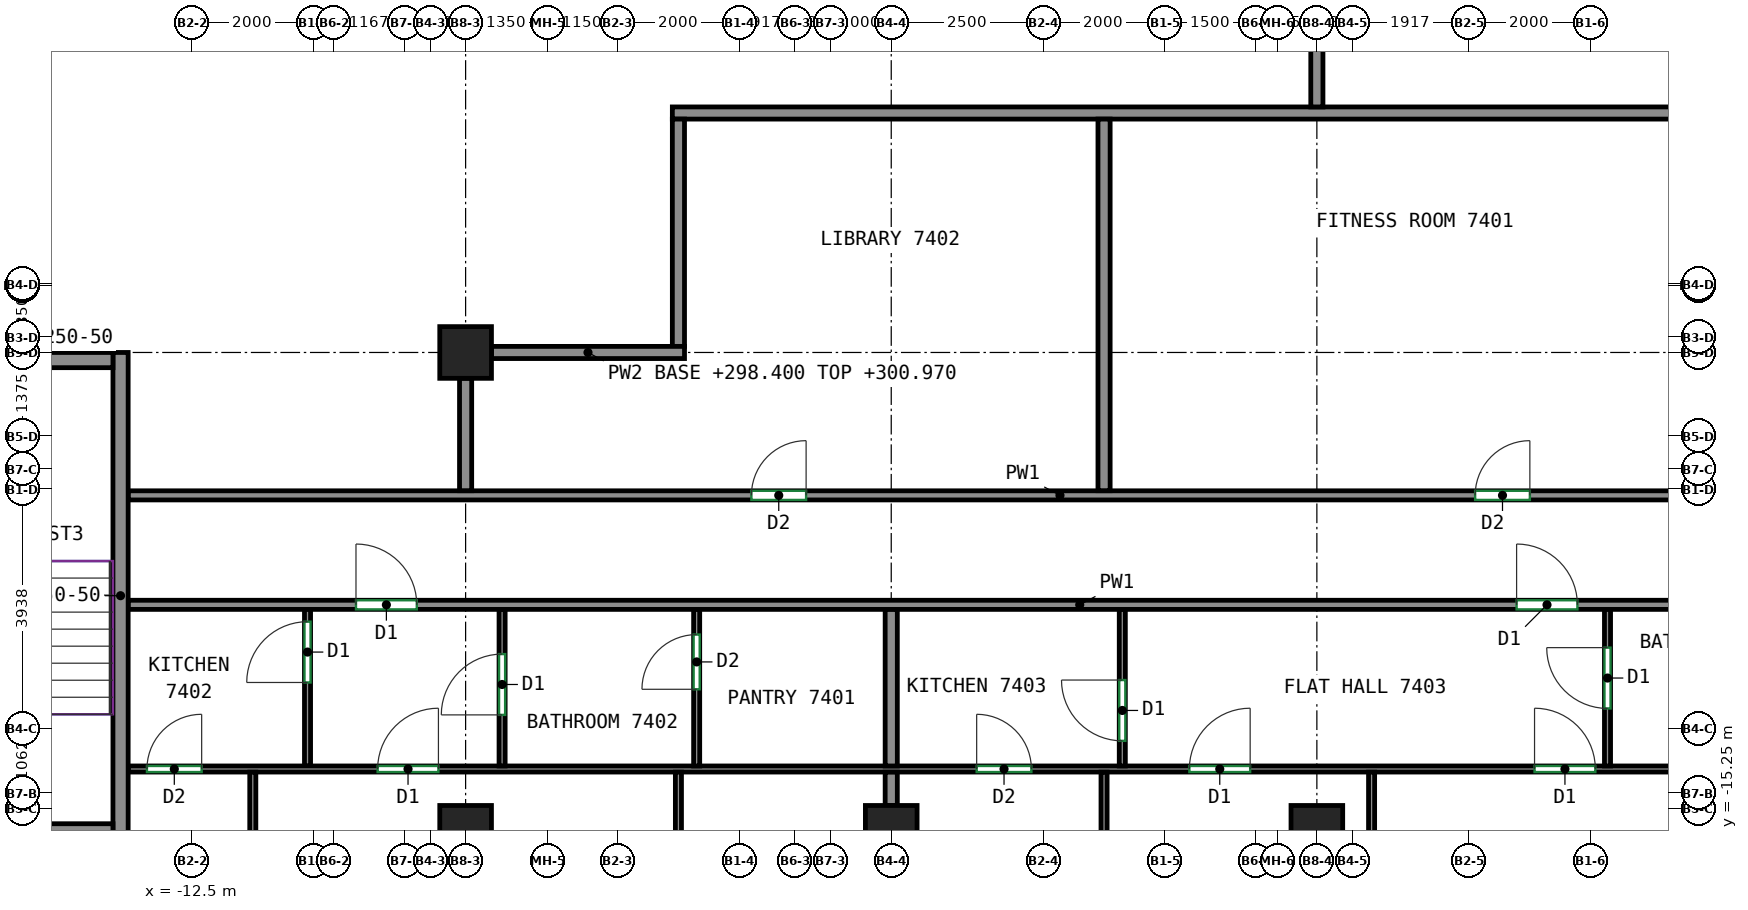
"""IFC4 building model, lengths in metres.
Left out: names, types, materials, properties, quantities, classifications, styles, units other than length and angle.
Written with IfcOpenShell. Run it as: python <this file> out.ifc"""

import sys

from ifc_helpers import new_model, si_unit, direction, frame, frame_2d, origin, origin_2d, place, context, subcontext, project, spatial, rectangle, extrude, source, transform, mapped, element, fill, save


model = new_model("IFC4")
c1 = context("Model", 3, precision=1e-05, world=origin(), true_north=direction((0.0, 1.0)))
c2 = subcontext(c1, "Body", "Model", "MODEL_VIEW")
j1 = project(units=[si_unit("LENGTHUNIT", "METRE"), si_unit("PLANEANGLEUNIT", "RADIAN")], contexts=[c1])
p1 = place(None, origin())
s1 = spatial("IfcSite", under=j1, at=p1, CompositionType="ELEMENT")
p2 = place(p1, origin())
s2 = spatial("IfcBuilding", under=s1, at=p2, CompositionType="ELEMENT")
p3 = place(p2, frame((0.0, 0.0, 298.4)))
s3 = spatial("IfcBuildingStorey", under=s2, at=p3, CompositionType="ELEMENT", Elevation=298.4)
m1 = source(origin(), c2, "Body", "SweptSolid", [
    extrude(rectangle(XDim=0.85, YDim=0.85, at=origin_2d()), origin(), (0.0, 0.0, 1.0), 3.12),
])
for number, where, z_axis, x_axis in (
    (1, (-8.0, -15.625, 0.0), (0.0, 0.0, 1.0), (1.0, 0.0, 0.0)),
    (2, (-8.0, -7.75, 0.0), (0.0, 0.0, 1.0), (1.0, 0.0, 0.0)),
    (3, (-1.0, -15.625, 0.0), (0.0, 0.0, 1.0), (1.0, 0.0, 0.0)),
    (4, (6.0, -15.625, 0.0), (0.0, 0.0, 1.0), (1.0, 0.0, 0.0)),
):
    element("IfcColumn", number, at=place(p3, frame(where, z_axis=z_axis, x_axis=x_axis)), inside=s3, PredefinedType="COLUMN", context=c2, shape_type="MappedRepresentation", body=[
        mapped(m1, transform((0.0, 0.0, 0.0))),
    ])
m2 = source(origin(), c2, "Body", "SweptSolid", [
    extrude(rectangle(XDim=8.0, YDim=0.25, at=frame_2d((4.0, 0.0))), origin(), (0.0, 0.0, 1.0), 3.12),
])
p4 = place(p3, frame((-13.675, -15.75, 0.0), z_axis=(0.0, 0.0, 1.0), x_axis=(0.0, 1.0, 0.0)))
e5 = element("IfcWall", 5, at=p4, inside=s3, PredefinedType="SHEAR", context=c2, shape_type="MappedRepresentation", body=[
    mapped(m2, transform((0.0, 0.0, 0.0))),
])
m3 = source(origin(), c2, "Body", "SweptSolid", [
    extrude(rectangle(XDim=3.7, YDim=0.25, at=frame_2d((1.85, 0.0))), origin(), (0.0, 0.0, 1.0), 3.12),
])
p5 = place(p3, frame((-17.5, -15.625, 0.0), z_axis=(0.0, 0.0, 1.0), x_axis=(1.0, 0.0, 0.0)))
e6 = element("IfcWall", 6, at=p5, inside=s3, PredefinedType="SHEAR", context=c2, shape_type="MappedRepresentation", body=[
    mapped(m3, transform((0.0, 0.0, 0.0))),
])
p6 = place(p5, frame((1.25, 0.0, 0.0)))
e7 = element("IfcOpeningElement", 7, at=p6, cuts=e6, PredefinedType="OPENING", context=c2, shape_type="SweptSolid", body=[
    extrude(rectangle(XDim=1.2, YDim=2.1, at=frame_2d((0.6, 1.05))), frame((0.0, 0.135, 0.0), z_axis=(0.0, -1.0, 0.0), x_axis=(1.0, 0.0, 0.0)), (0.0, 0.0, 1.0), 0.27),
])
p7 = place(p3, frame((-17.5, -7.875, 0.0), z_axis=(0.0, 0.0, 1.0), x_axis=(1.0, 0.0, 0.0)))
e8 = element("IfcWall", 8, at=p7, inside=s3, PredefinedType="SHEAR", context=c2, shape_type="MappedRepresentation", body=[
    mapped(m3, transform((0.0, 0.0, 0.0))),
])
p8 = place(p3, frame((-13.55, -11.9, 0.0), z_axis=(0.0, 0.0, 1.0), x_axis=(1.0, 0.0, 0.0)))
e9 = element("IfcWall", 9, at=p8, inside=s3, PredefinedType="PARTITIONING", context=c2, shape_type="SweptSolid", body=[
    extrude(rectangle(XDim=31.3, YDim=0.15, at=frame_2d((15.65, 0.0))), origin(), (0.0, 0.0, 1.0), 3.12),
])
p9 = place(p8, frame((3.747, 0.0, 0.0)))
e10 = element("IfcOpeningElement", 10, at=p9, cuts=e9, PredefinedType="OPENING", context=c2, shape_type="SweptSolid", body=[
    extrude(rectangle(XDim=1.0, YDim=2.1, at=frame_2d((0.5, 1.05))), frame((0.0, 0.085, 0.0), z_axis=(0.0, -1.0, 0.0), x_axis=(1.0, 0.0, 0.0)), (0.0, 0.0, 1.0), 0.17),
])
p10 = place(p8, frame((22.835, 0.0, 0.0)))
e11 = element("IfcOpeningElement", 11, at=p10, cuts=e9, PredefinedType="OPENING", context=c2, shape_type="SweptSolid", body=[
    extrude(rectangle(XDim=1.0, YDim=2.1, at=frame_2d((0.5, 1.05))), frame((0.0, 0.085, 0.0), z_axis=(0.0, -1.0, 0.0), x_axis=(1.0, 0.0, 0.0)), (0.0, 0.0, 1.0), 0.17),
])
p11 = place(p3, frame((-13.55, -10.1, 0.0), z_axis=(0.0, 0.0, 1.0), x_axis=(1.0, 0.0, 0.0)))
e12 = element("IfcWall", 12, at=p11, inside=s3, PredefinedType="PARTITIONING", context=c2, shape_type="SweptSolid", body=[
    extrude(rectangle(XDim=30.65, YDim=0.15, at=frame_2d((15.325, 0.0))), origin(), (0.0, 0.0, 1.0), 3.12),
])
p12 = place(p11, frame((10.25, 0.0, 0.0)))
e13 = element("IfcOpeningElement", 13, at=p12, cuts=e12, PredefinedType="OPENING", context=c2, shape_type="SweptSolid", body=[
    extrude(rectangle(XDim=0.9, YDim=2.1, at=frame_2d((0.45, 1.05))), frame((0.0, 0.085, 0.0), z_axis=(0.0, -1.0, 0.0), x_axis=(1.0, 0.0, 0.0)), (0.0, 0.0, 1.0), 0.17),
])
p13 = place(p11, frame((22.153, 0.0, 0.0)))
e14 = element("IfcOpeningElement", 14, at=p13, cuts=e12, PredefinedType="OPENING", context=c2, shape_type="SweptSolid", body=[
    extrude(rectangle(XDim=0.9, YDim=2.1, at=frame_2d((0.45, 1.05))), frame((0.0, 0.085, 0.0), z_axis=(0.0, -1.0, 0.0), x_axis=(1.0, 0.0, 0.0)), (0.0, 0.0, 1.0), 0.17),
])
p14 = place(p3, frame((-10.6, -14.55, 0.0), z_axis=(0.0, 0.0, 1.0), x_axis=(0.0, 1.0, 0.0)))
e15 = element("IfcWall", 15, at=p14, inside=s3, PredefinedType="PARTITIONING", context=c2, shape_type="SweptSolid", body=[
    extrude(rectangle(XDim=2.573, YDim=0.1, at=frame_2d((1.287, 0.0))), origin(), (0.0, 0.0, 1.0), 3.12),
])
p15 = place(p14, frame((1.373, 0.0, 0.0)))
e16 = element("IfcOpeningElement", 16, at=p15, cuts=e15, PredefinedType="OPENING", context=c2, shape_type="SweptSolid", body=[
    extrude(rectangle(XDim=1.0, YDim=2.1, at=frame_2d((0.5, 1.05))), frame((0.0, 0.06, 0.0), z_axis=(0.0, -1.0, 0.0), x_axis=(1.0, 0.0, 0.0)), (0.0, 0.0, 1.0), 0.12),
])
p16 = place(p3, frame((-13.55, -14.6, 0.0), z_axis=(0.0, 0.0, 1.0), x_axis=(1.0, 0.0, 0.0)))
e17 = element("IfcWall", 17, at=p16, inside=s3, PredefinedType="PARTITIONING", context=c2, shape_type="SweptSolid", body=[
    extrude(rectangle(XDim=31.3, YDim=0.1, at=frame_2d((15.65, 0.0))), origin(), (0.0, 0.0, 1.0), 3.12),
])
p17 = place(p16, frame((0.309, 0.0, 0.0)))
e18 = element("IfcOpeningElement", 18, at=p17, cuts=e17, PredefinedType="OPENING", context=c2, shape_type="SweptSolid", body=[
    extrude(rectangle(XDim=0.9, YDim=2.1, at=frame_2d((0.45, 1.05))), frame((0.0, 0.06, 0.0), z_axis=(0.0, -1.0, 0.0), x_axis=(1.0, 0.0, 0.0)), (0.0, 0.0, 1.0), 0.12),
])
p18 = place(p16, frame((4.103, 0.0, 0.0)))
e19 = element("IfcOpeningElement", 19, at=p18, cuts=e17, PredefinedType="OPENING", context=c2, shape_type="SweptSolid", body=[
    extrude(rectangle(XDim=1.0, YDim=2.1, at=frame_2d((0.5, 1.05))), frame((0.0, 0.06, 0.0), z_axis=(0.0, -1.0, 0.0), x_axis=(1.0, 0.0, 0.0)), (0.0, 0.0, 1.0), 0.12),
])
p19 = place(p16, frame((13.955, 0.0, 0.0)))
e20 = element("IfcOpeningElement", 20, at=p19, cuts=e17, PredefinedType="OPENING", context=c2, shape_type="SweptSolid", body=[
    extrude(rectangle(XDim=0.9, YDim=2.1, at=frame_2d((0.45, 1.05))), frame((0.0, 0.06, 0.0), z_axis=(0.0, -1.0, 0.0), x_axis=(1.0, 0.0, 0.0)), (0.0, 0.0, 1.0), 0.12),
])
p20 = place(p16, frame((17.453, 0.0, 0.0)))
e21 = element("IfcOpeningElement", 21, at=p20, cuts=e17, PredefinedType="OPENING", context=c2, shape_type="SweptSolid", body=[
    extrude(rectangle(XDim=1.0, YDim=2.1, at=frame_2d((0.5, 1.05))), frame((0.0, 0.06, 0.0), z_axis=(0.0, -1.0, 0.0), x_axis=(1.0, 0.0, 0.0)), (0.0, 0.0, 1.0), 0.12),
])
p21 = place(p16, frame((23.13, 0.0, 0.0)))
e22 = element("IfcOpeningElement", 22, at=p21, cuts=e17, PredefinedType="OPENING", context=c2, shape_type="SweptSolid", body=[
    extrude(rectangle(XDim=1.0, YDim=2.1, at=frame_2d((0.5, 1.05))), frame((0.0, 0.06, 0.0), z_axis=(0.0, -1.0, 0.0), x_axis=(1.0, 0.0, 0.0)), (0.0, 0.0, 1.0), 0.12),
])
p22 = place(p3, frame((-7.4, -14.55, 0.0), z_axis=(0.0, 0.0, 1.0), x_axis=(0.0, 1.0, 0.0)))
e23 = element("IfcWall", 23, at=p22, inside=s3, PredefinedType="PARTITIONING", context=c2, shape_type="SweptSolid", body=[
    extrude(rectangle(XDim=2.573, YDim=0.1, at=frame_2d((1.287, 0.0))), origin(), (0.0, 0.0, 1.0), 3.12),
])
p23 = place(p22, frame((0.84, 0.0, 0.0)))
e24 = element("IfcOpeningElement", 24, at=p23, cuts=e23, PredefinedType="OPENING", context=c2, shape_type="SweptSolid", body=[
    extrude(rectangle(XDim=1.0, YDim=2.1, at=frame_2d((0.5, 1.05))), frame((0.0, 0.06, 0.0), z_axis=(0.0, -1.0, 0.0), x_axis=(1.0, 0.0, 0.0)), (0.0, 0.0, 1.0), 0.12),
])
p24 = place(p3, frame((-4.2, -14.55, 0.0), z_axis=(0.0, 0.0, 1.0), x_axis=(0.0, 1.0, 0.0)))
e25 = element("IfcWall", 25, at=p24, inside=s3, PredefinedType="PARTITIONING", context=c2, shape_type="SweptSolid", body=[
    extrude(rectangle(XDim=2.573, YDim=0.1, at=frame_2d((1.287, 0.0))), origin(), (0.0, 0.0, 1.0), 3.12),
])
p25 = place(p24, frame((1.261, 0.0, 0.0)))
e26 = element("IfcOpeningElement", 26, at=p25, cuts=e25, PredefinedType="OPENING", context=c2, shape_type="SweptSolid", body=[
    extrude(rectangle(XDim=0.9, YDim=2.1, at=frame_2d((0.45, 1.05))), frame((0.0, 0.06, 0.0), z_axis=(0.0, -1.0, 0.0), x_axis=(1.0, 0.0, 0.0)), (0.0, 0.0, 1.0), 0.12),
])
p26 = place(p3, frame((-1.0, -14.55, 0.0), z_axis=(0.0, 0.0, 1.0), x_axis=(0.0, 1.0, 0.0)))
e27 = element("IfcWall", 27, at=p26, inside=s3, PredefinedType="PARTITIONING", context=c2, shape_type="SweptSolid", body=[
    extrude(rectangle(XDim=2.573, YDim=0.2, at=frame_2d((1.287, 0.0))), origin(), (0.0, 0.0, 1.0), 3.12),
])
p27 = place(p3, frame((-11.5, -23.25, 0.0), z_axis=(0.0, 0.0, 1.0), x_axis=(0.0, 1.0, 0.0)))
e28 = element("IfcWall", 28, at=p27, inside=s3, PredefinedType="PARTITIONING", context=c2, shape_type="SweptSolid", body=[
    extrude(rectangle(XDim=8.598, YDim=0.1, at=frame_2d((4.299, 0.0))), origin(), (0.0, 0.0, 1.0), 3.12),
])
p28 = place(p3, frame((-4.5, -23.25, 0.0), z_axis=(0.0, 0.0, 1.0), x_axis=(0.0, 1.0, 0.0)))
e29 = element("IfcWall", 29, at=p28, inside=s3, PredefinedType="PARTITIONING", context=c2, shape_type="SweptSolid", body=[
    extrude(rectangle(XDim=8.598, YDim=0.1, at=frame_2d((4.299, 0.0))), origin(), (0.0, 0.0, 1.0), 3.12),
])
p29 = place(p28, frame((1.112, 0.0, 0.0)))
e30 = element("IfcOpeningElement", 30, at=p29, cuts=e29, PredefinedType="OPENING", context=c2, shape_type="SweptSolid", body=[
    extrude(rectangle(XDim=0.9, YDim=2.1, at=frame_2d((0.45, 1.05))), frame((0.0, 0.06, 0.0), z_axis=(0.0, -1.0, 0.0), x_axis=(1.0, 0.0, 0.0)), (0.0, 0.0, 1.0), 0.12),
])
p30 = place(p3, frame((-1.0, -15.2, 0.0), z_axis=(0.0, 0.0, 1.0), x_axis=(0.0, 1.0, 0.0)))
e31 = element("IfcWall", 31, at=p30, inside=s3, PredefinedType="PARTITIONING", context=c2, shape_type="SweptSolid", body=[
    extrude(rectangle(XDim=0.548, YDim=0.2, at=frame_2d((0.274, 0.0))), origin(), (0.0, 0.0, 1.0), 3.12),
])
p31 = place(p3, frame((2.8, -14.55, 0.0), z_axis=(0.0, 0.0, 1.0), x_axis=(0.0, 1.0, 0.0)))
e32 = element("IfcWall", 32, at=p31, inside=s3, PredefinedType="PARTITIONING", context=c2, shape_type="SweptSolid", body=[
    extrude(rectangle(XDim=2.573, YDim=0.1, at=frame_2d((1.287, 0.0))), origin(), (0.0, 0.0, 1.0), 3.12),
])
p32 = place(p31, frame((0.413, 0.0, 0.0)))
e33 = element("IfcOpeningElement", 33, at=p32, cuts=e32, PredefinedType="OPENING", context=c2, shape_type="SweptSolid", body=[
    extrude(rectangle(XDim=1.0, YDim=2.1, at=frame_2d((0.5, 1.05))), frame((0.0, 0.06, 0.0), z_axis=(0.0, -1.0, 0.0), x_axis=(1.0, 0.0, 0.0)), (0.0, 0.0, 1.0), 0.12),
])
p33 = place(p3, frame((10.78, -14.55, 0.0), z_axis=(0.0, 0.0, 1.0), x_axis=(0.0, 1.0, 0.0)))
e34 = element("IfcWall", 34, at=p33, inside=s3, PredefinedType="PARTITIONING", context=c2, shape_type="SweptSolid", body=[
    extrude(rectangle(XDim=2.573, YDim=0.1, at=frame_2d((1.287, 0.0))), origin(), (0.0, 0.0, 1.0), 3.12),
])
p34 = place(p33, frame((0.946, 0.0, 0.0)))
e35 = element("IfcOpeningElement", 35, at=p34, cuts=e34, PredefinedType="OPENING", context=c2, shape_type="SweptSolid", body=[
    extrude(rectangle(XDim=1.0, YDim=2.1, at=frame_2d((0.5, 1.05))), frame((0.0, 0.06, 0.0), z_axis=(0.0, -1.0, 0.0), x_axis=(1.0, 0.0, 0.0)), (0.0, 0.0, 1.0), 0.12),
])
for number, where, z_axis, x_axis in (
    (36, (2.5, -23.25, 0.0), (0.0, 0.0, 1.0), (0.0, 1.0, 0.0)),
    (37, (6.9, -23.25, 0.0), (0.0, 0.0, 1.0), (0.0, 1.0, 0.0)),
):
    element("IfcWall", number, at=place(p3, frame(where, z_axis=z_axis, x_axis=x_axis)), inside=s3, PredefinedType="PARTITIONING", context=c2, shape_type="SweptSolid", body=[
        extrude(rectangle(XDim=8.598, YDim=0.1, at=frame_2d((4.299, 0.0))), origin(), (0.0, 0.0, 1.0), 3.12),
    ])
p35 = place(p3, frame((-4.6, -3.812, 0.0), z_axis=(0.0, 0.0, 1.0), x_axis=(1.0, 0.0, 0.0)))
e38 = element("IfcWall", 38, at=p35, inside=s3, PredefinedType="PARTITIONING", context=c2, shape_type="SweptSolid", body=[
    extrude(rectangle(XDim=17.7, YDim=0.2, at=frame_2d((8.85, 0.0))), origin(), (0.0, 0.0, 1.0), 3.12),
])
p36 = place(p3, frame((-4.5, -7.65, 0.0), z_axis=(0.0, 0.0, 1.0), x_axis=(0.0, 1.0, 0.0)))
e39 = element("IfcWall", 39, at=p36, inside=s3, PredefinedType="PARTITIONING", context=c2, shape_type="SweptSolid", body=[
    extrude(rectangle(XDim=3.738, YDim=0.2, at=frame_2d((1.869, 0.0))), origin(), (0.0, 0.0, 1.0), 3.12),
])
p37 = place(p3, frame((-7.575, -7.75, 0.0), z_axis=(0.0, 0.0, 1.0), x_axis=(1.0, 0.0, 0.0)))
e40 = element("IfcWall", 40, at=p37, inside=s3, PredefinedType="PARTITIONING", context=c2, shape_type="SweptSolid", body=[
    extrude(rectangle(XDim=3.175, YDim=0.2, at=frame_2d((1.587, 0.0))), origin(), (0.0, 0.0, 1.0), 2.57),
])
p38 = place(p3, frame((-8.0, -10.023, 0.0), z_axis=(0.0, 0.0, 1.0), x_axis=(0.0, 1.0, 0.0)))
e41 = element("IfcWall", 41, at=p38, inside=s3, PredefinedType="PARTITIONING", context=c2, shape_type="SweptSolid", body=[
    extrude(rectangle(XDim=1.848, YDim=0.2, at=frame_2d((0.924, 0.0))), origin(), (0.0, 0.0, 1.0), 3.12),
])
p39 = place(p3, frame((6.0, -3.712, 0.0), z_axis=(0.0, 0.0, 1.0), x_axis=(0.0, 1.0, 0.0)))
e42 = element("IfcWall", 42, at=p39, inside=s3, PredefinedType="PARTITIONING", context=c2, shape_type="SweptSolid", body=[
    extrude(rectangle(XDim=3.503, YDim=0.2, at=frame_2d((1.751, 0.0))), origin(), (0.0, 0.0, 1.0), 3.12),
])
p40 = place(p3, frame((2.5, -10.023, 0.0), z_axis=(0.0, 0.0, 1.0), x_axis=(0.0, 1.0, 0.0)))
e43 = element("IfcWall", 43, at=p40, inside=s3, PredefinedType="PARTITIONING", context=c2, shape_type="SweptSolid", body=[
    extrude(rectangle(XDim=6.111, YDim=0.2, at=frame_2d((3.055, 0.0))), origin(), (0.0, 0.0, 1.0), 3.12),
])
p41 = place(p17, origin())
e44 = element("IfcDoor", 44, at=p41, inside=s3, OperationType="SINGLE_SWING_RIGHT", PredefinedType="DOOR", context=c2, shape_type="SweptSolid", body=[
    extrude(rectangle(XDim=0.9, YDim=2.1, at=frame_2d((0.45, 1.05))), frame((0.0, 0.025, 0.0), z_axis=(0.0, -1.0, 0.0), x_axis=(1.0, 0.0, 0.0)), (0.0, 0.0, 1.0), 0.05),
])
fill(e18, e44)
p42 = place(p18, origin())
e45 = element("IfcDoor", 45, at=p42, inside=s3, OperationType="SINGLE_SWING_RIGHT", PredefinedType="DOOR", context=c2, shape_type="SweptSolid", body=[
    extrude(rectangle(XDim=1.0, YDim=2.1, at=frame_2d((0.5, 1.05))), frame((0.0, 0.025, 0.0), z_axis=(0.0, -1.0, 0.0), x_axis=(1.0, 0.0, 0.0)), (0.0, 0.0, 1.0), 0.05),
])
fill(e19, e45)
p43 = place(p19, origin())
e46 = element("IfcDoor", 46, at=p43, inside=s3, OperationType="SINGLE_SWING_LEFT", PredefinedType="DOOR", context=c2, shape_type="SweptSolid", body=[
    extrude(rectangle(XDim=0.9, YDim=2.1, at=frame_2d((0.45, 1.05))), frame((0.0, 0.025, 0.0), z_axis=(0.0, -1.0, 0.0), x_axis=(1.0, 0.0, 0.0)), (0.0, 0.0, 1.0), 0.05),
])
fill(e20, e46)
p44 = place(p20, origin())
e47 = element("IfcDoor", 47, at=p44, inside=s3, OperationType="SINGLE_SWING_RIGHT", PredefinedType="DOOR", context=c2, shape_type="SweptSolid", body=[
    extrude(rectangle(XDim=1.0, YDim=2.1, at=frame_2d((0.5, 1.05))), frame((0.0, 0.025, 0.0), z_axis=(0.0, -1.0, 0.0), x_axis=(1.0, 0.0, 0.0)), (0.0, 0.0, 1.0), 0.05),
])
fill(e21, e47)
p45 = place(p21, origin())
e48 = element("IfcDoor", 48, at=p45, inside=s3, OperationType="SINGLE_SWING_LEFT", PredefinedType="DOOR", context=c2, shape_type="SweptSolid", body=[
    extrude(rectangle(XDim=1.0, YDim=2.1, at=frame_2d((0.5, 1.05))), frame((0.0, 0.025, 0.0), z_axis=(0.0, -1.0, 0.0), x_axis=(1.0, 0.0, 0.0)), (0.0, 0.0, 1.0), 0.05),
])
fill(e22, e48)
p46 = place(p32, origin())
e49 = element("IfcDoor", 49, at=p46, inside=s3, OperationType="SINGLE_SWING_RIGHT", PredefinedType="DOOR", context=c2, shape_type="SweptSolid", body=[
    extrude(rectangle(XDim=1.0, YDim=2.1, at=frame_2d((0.5, 1.05))), frame((0.0, 0.025, 0.0), z_axis=(0.0, -1.0, 0.0), x_axis=(1.0, 0.0, 0.0)), (0.0, 0.0, 1.0), 0.05),
])
fill(e33, e49)
p47 = place(p23, origin())
e50 = element("IfcDoor", 50, at=p47, inside=s3, OperationType="SINGLE_SWING_LEFT", PredefinedType="DOOR", context=c2, shape_type="SweptSolid", body=[
    extrude(rectangle(XDim=1.0, YDim=2.1, at=frame_2d((0.5, 1.05))), frame((0.0, 0.025, 0.0), z_axis=(0.0, -1.0, 0.0), x_axis=(1.0, 0.0, 0.0)), (0.0, 0.0, 1.0), 0.05),
])
fill(e24, e50)
p48 = place(p34, origin())
e51 = element("IfcDoor", 51, at=p48, inside=s3, OperationType="SINGLE_SWING_RIGHT", PredefinedType="DOOR", context=c2, shape_type="SweptSolid", body=[
    extrude(rectangle(XDim=1.0, YDim=2.1, at=frame_2d((0.5, 1.05))), frame((0.0, 0.025, 0.0), z_axis=(0.0, -1.0, 0.0), x_axis=(1.0, 0.0, 0.0)), (0.0, 0.0, 1.0), 0.05),
])
fill(e35, e51)
p49 = place(p25, origin())
e52 = element("IfcDoor", 52, at=p49, inside=s3, OperationType="SINGLE_SWING_LEFT", PredefinedType="DOOR", context=c2, shape_type="SweptSolid", body=[
    extrude(rectangle(XDim=0.9, YDim=2.1, at=frame_2d((0.45, 1.05))), frame((0.0, 0.025, 0.0), z_axis=(0.0, -1.0, 0.0), x_axis=(1.0, 0.0, 0.0)), (0.0, 0.0, 1.0), 0.05),
])
fill(e26, e52)
p50 = place(p15, origin())
e53 = element("IfcDoor", 53, at=p50, inside=s3, OperationType="SINGLE_SWING_LEFT", PredefinedType="DOOR", context=c2, shape_type="SweptSolid", body=[
    extrude(rectangle(XDim=1.0, YDim=2.1, at=frame_2d((0.5, 1.05))), frame((0.0, 0.025, 0.0), z_axis=(0.0, -1.0, 0.0), x_axis=(1.0, 0.0, 0.0)), (0.0, 0.0, 1.0), 0.05),
])
fill(e16, e53)
p51 = place(p9, origin())
e54 = element("IfcDoor", 54, at=p51, inside=s3, OperationType="SINGLE_SWING_LEFT", PredefinedType="DOOR", context=c2, shape_type="SweptSolid", body=[
    extrude(rectangle(XDim=1.0, YDim=2.1, at=frame_2d((0.5, 1.05))), frame((0.0, 0.025, 0.0), z_axis=(0.0, -1.0, 0.0), x_axis=(1.0, 0.0, 0.0)), (0.0, 0.0, 1.0), 0.05),
])
fill(e10, e54)
p52 = place(p10, origin())
e55 = element("IfcDoor", 55, at=p52, inside=s3, OperationType="SINGLE_SWING_LEFT", PredefinedType="DOOR", context=c2, shape_type="SweptSolid", body=[
    extrude(rectangle(XDim=1.0, YDim=2.1, at=frame_2d((0.5, 1.05))), frame((0.0, 0.025, 0.0), z_axis=(0.0, -1.0, 0.0), x_axis=(1.0, 0.0, 0.0)), (0.0, 0.0, 1.0), 0.05),
])
fill(e11, e55)
p53 = place(p12, origin())
e56 = element("IfcDoor", 56, at=p53, inside=s3, OperationType="SINGLE_SWING_RIGHT", PredefinedType="DOOR", context=c2, shape_type="SweptSolid", body=[
    extrude(rectangle(XDim=0.9, YDim=2.1, at=frame_2d((0.45, 1.05))), frame((0.0, 0.025, 0.0), z_axis=(0.0, -1.0, 0.0), x_axis=(1.0, 0.0, 0.0)), (0.0, 0.0, 1.0), 0.05),
])
fill(e13, e56)
p54 = place(p13, origin())
e57 = element("IfcDoor", 57, at=p54, inside=s3, OperationType="SINGLE_SWING_RIGHT", PredefinedType="DOOR", context=c2, shape_type="SweptSolid", body=[
    extrude(rectangle(XDim=0.9, YDim=2.1, at=frame_2d((0.45, 1.05))), frame((0.0, 0.025, 0.0), z_axis=(0.0, -1.0, 0.0), x_axis=(1.0, 0.0, 0.0)), (0.0, 0.0, 1.0), 0.05),
])
fill(e14, e57)
save(model, sys.argv[1])
